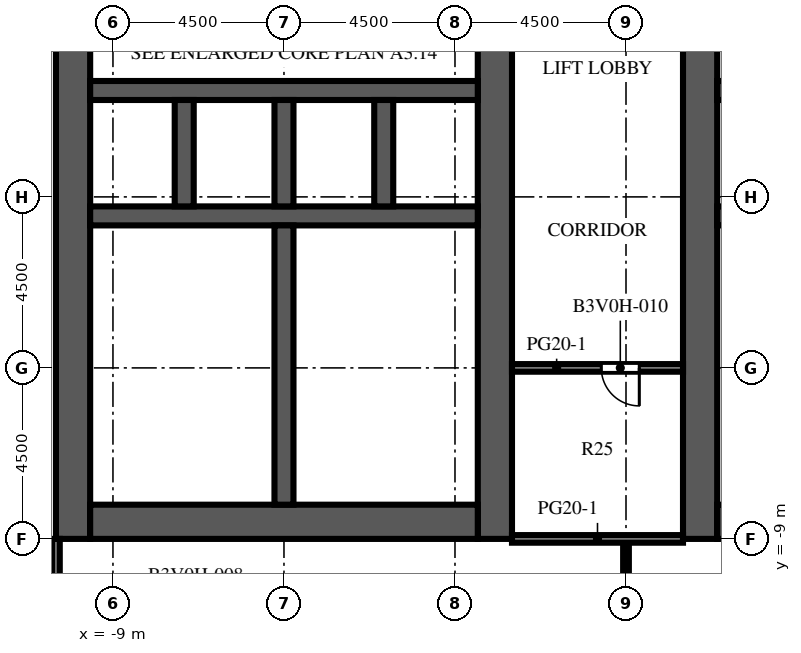
"""IFC4 building model, lengths in metres.
Left out: names, types, materials, properties, quantities, classifications, styles, units other than length and angle.
Written with IfcOpenShell. Run it as: python <this file> out.ifc"""

import sys

from ifc_helpers import new_model, si_unit, direction, frame, frame_2d, origin, place, context, subcontext, project, spatial, rectangle, extrude, element, fill, save


model = new_model("IFC4")
c1 = context("Model", 3, precision=1e-05, world=origin(), true_north=direction((0.0, 1.0)))
c2 = subcontext(c1, "Body", "Model", "MODEL_VIEW")
j1 = project(units=[si_unit("LENGTHUNIT", "METRE"), si_unit("PLANEANGLEUNIT", "RADIAN")], contexts=[c1])
p1 = place(None, origin())
s1 = spatial("IfcSite", under=j1, at=p1, CompositionType="ELEMENT")
p2 = place(p1, origin())
s2 = spatial("IfcBuilding", under=s1, at=p2, CompositionType="ELEMENT")
p3 = place(p2, frame((0.0, 0.0, 82.0)))
s3 = spatial("IfcBuildingStorey", under=s2, at=p3, CompositionType="ELEMENT", Elevation=82.0)
p4 = place(p3, frame((-10.05, -9.0, 0.0), z_axis=(0.0, 0.0, 1.0), x_axis=(0.0, 1.0, 0.0)))
e1 = element("IfcWall", 1, at=p4, inside=s3, PredefinedType="SHEAR", context=c2, shape_type="SweptSolid", body=[
    extrude(rectangle(XDim=27.5, YDim=0.9, at=frame_2d((13.75, 0.0))), origin(), (0.0, 0.0, 1.0), 4.1),
])
p5 = place(p4, frame((12.55, 0.0, 0.0)))
e2 = element("IfcOpeningElement", 2, at=p5, cuts=e1, PredefinedType="OPENING", context=c2, shape_type="SweptSolid", body=[
    extrude(rectangle(XDim=2.4, YDim=2.4, at=frame_2d((1.2, 1.2))), frame((0.0, 0.46, 0.0), z_axis=(0.0, -1.0, 0.0), x_axis=(1.0, 0.0, 0.0)), (0.0, 0.0, 1.0), 0.92),
])
p6 = place(p4, frame((6.825, 0.0, 0.0)))
e3 = element("IfcOpeningElement", 3, at=p6, cuts=e1, PredefinedType="OPENING", context=c2, shape_type="SweptSolid", body=[
    extrude(rectangle(XDim=1.2, YDim=2.1, at=frame_2d((0.6, 1.05))), frame((0.0, 0.46, 0.0), z_axis=(0.0, -1.0, 0.0), x_axis=(1.0, 0.0, 0.0)), (0.0, 0.0, 1.0), 0.92),
])
p7 = place(p4, frame((19.475, 0.0, 0.0)))
e4 = element("IfcOpeningElement", 4, at=p7, cuts=e1, PredefinedType="OPENING", context=c2, shape_type="SweptSolid", body=[
    extrude(rectangle(XDim=1.2, YDim=2.1, at=frame_2d((0.6, 1.05))), frame((0.0, 0.46, 0.0), z_axis=(0.0, -1.0, 0.0), x_axis=(1.0, 0.0, 0.0)), (0.0, 0.0, 1.0), 0.92),
])
p8 = place(p3, frame((1.05, -9.0, 0.0), z_axis=(0.0, 0.0, 1.0), x_axis=(0.0, 1.0, 0.0)))
e5 = element("IfcWall", 5, at=p8, inside=s3, PredefinedType="SHEAR", context=c2, shape_type="SweptSolid", body=[
    extrude(rectangle(XDim=27.5, YDim=0.9, at=frame_2d((13.75, 0.0))), origin(), (0.0, 0.0, 1.0), 4.1),
])
p9 = place(p8, frame((12.55, 0.0, 0.0)))
e6 = element("IfcOpeningElement", 6, at=p9, cuts=e5, PredefinedType="OPENING", context=c2, shape_type="SweptSolid", body=[
    extrude(rectangle(XDim=2.4, YDim=2.4, at=frame_2d((1.2, 1.2))), frame((0.0, 0.46, 0.0), z_axis=(0.0, -1.0, 0.0), x_axis=(1.0, 0.0, 0.0)), (0.0, 0.0, 1.0), 0.92),
])
p10 = place(p8, frame((5.445, 0.0, 0.0)))
e7 = element("IfcOpeningElement", 7, at=p10, cuts=e5, PredefinedType="OPENING", context=c2, shape_type="SweptSolid", body=[
    extrude(rectangle(XDim=1.2, YDim=2.1, at=frame_2d((0.6, 1.05))), frame((0.0, 0.46, 0.0), z_axis=(0.0, -1.0, 0.0), x_axis=(1.0, 0.0, 0.0)), (0.0, 0.0, 1.0), 0.92),
])
p11 = place(p8, frame((19.485, 0.0, 0.0)))
e8 = element("IfcOpeningElement", 8, at=p11, cuts=e5, PredefinedType="OPENING", context=c2, shape_type="SweptSolid", body=[
    extrude(rectangle(XDim=1.0, YDim=2.1, at=frame_2d((0.5, 1.05))), frame((0.0, 0.46, 0.0), z_axis=(0.0, -1.0, 0.0), x_axis=(1.0, 0.0, 0.0)), (0.0, 0.0, 1.0), 0.92),
])
p12 = place(p8, frame((21.139, 0.0, 0.0)))
e9 = element("IfcOpeningElement", 9, at=p12, cuts=e5, PredefinedType="OPENING", context=c2, shape_type="SweptSolid", body=[
    extrude(rectangle(XDim=1.0, YDim=2.1, at=frame_2d((0.5, 1.05))), frame((0.0, 0.46, 0.0), z_axis=(0.0, -1.0, 0.0), x_axis=(1.0, 0.0, 0.0)), (0.0, 0.0, 1.0), 0.92),
])
p13 = place(p8, frame((23.16, 0.0, 0.0)))
e10 = element("IfcOpeningElement", 10, at=p13, cuts=e5, PredefinedType="OPENING", context=c2, shape_type="SweptSolid", body=[
    extrude(rectangle(XDim=1.0, YDim=2.1, at=frame_2d((0.5, 1.05))), frame((0.0, 0.46, 0.0), z_axis=(0.0, -1.0, 0.0), x_axis=(1.0, 0.0, 0.0)), (0.0, 0.0, 1.0), 0.92),
])
p14 = place(p8, frame((25.181, 0.0, 0.0)))
e11 = element("IfcOpeningElement", 11, at=p14, cuts=e5, PredefinedType="OPENING", context=c2, shape_type="SweptSolid", body=[
    extrude(rectangle(XDim=1.0, YDim=2.1, at=frame_2d((0.5, 1.05))), frame((0.0, 0.46, 0.0), z_axis=(0.0, -1.0, 0.0), x_axis=(1.0, 0.0, 0.0)), (0.0, 0.0, 1.0), 0.92),
])
p15 = place(p3, frame((-9.6, -8.55, 0.0), z_axis=(0.0, 0.0, 1.0), x_axis=(1.0, 0.0, 0.0)))
e12 = element("IfcWall", 12, at=p15, inside=s3, PredefinedType="SHEAR", context=c2, shape_type="SweptSolid", body=[
    extrude(rectangle(XDim=10.2, YDim=0.9, at=frame_2d((5.1, 0.0))), origin(), (0.0, 0.0, 1.0), 4.1),
])
p16 = place(p3, frame((-9.6, -0.5, 0.0), z_axis=(0.0, 0.0, 1.0), x_axis=(1.0, 0.0, 0.0)))
e13 = element("IfcWall", 13, at=p16, inside=s3, PredefinedType="SHEAR", context=c2, shape_type="SweptSolid", body=[
    extrude(rectangle(XDim=10.2, YDim=0.5, at=frame_2d((5.1, 0.0))), origin(), (0.0, 0.0, 1.0), 4.1),
])
p17 = place(p3, frame((-9.6, 2.8, 0.0), z_axis=(0.0, 0.0, 1.0), x_axis=(1.0, 0.0, 0.0)))
e14 = element("IfcWall", 14, at=p17, inside=s3, PredefinedType="SHEAR", context=c2, shape_type="SweptSolid", body=[
    extrude(rectangle(XDim=10.2, YDim=0.5, at=frame_2d((5.1, 0.0))), origin(), (0.0, 0.0, 1.0), 4.1),
])
p18 = place(p17, frame((0.562, 0.0, 0.0)))
e15 = element("IfcOpeningElement", 15, at=p18, cuts=e14, PredefinedType="OPENING", context=c2, shape_type="SweptSolid", body=[
    extrude(rectangle(XDim=1.1, YDim=2.1, at=frame_2d((0.55, 1.05))), frame((0.0, 0.26, 0.0), z_axis=(0.0, -1.0, 0.0), x_axis=(1.0, 0.0, 0.0)), (0.0, 0.0, 1.0), 0.52),
])
p19 = place(p17, frame((3.238, 0.0, 0.0)))
e16 = element("IfcOpeningElement", 16, at=p19, cuts=e14, PredefinedType="OPENING", context=c2, shape_type="SweptSolid", body=[
    extrude(rectangle(XDim=1.1, YDim=2.1, at=frame_2d((0.55, 1.05))), frame((0.0, 0.26, 0.0), z_axis=(0.0, -1.0, 0.0), x_axis=(1.0, 0.0, 0.0)), (0.0, 0.0, 1.0), 0.52),
])
p20 = place(p17, frame((8.538, 0.0, 0.0)))
e17 = element("IfcOpeningElement", 17, at=p20, cuts=e14, PredefinedType="OPENING", context=c2, shape_type="SweptSolid", body=[
    extrude(rectangle(XDim=1.1, YDim=2.1, at=frame_2d((0.55, 1.05))), frame((0.0, 0.26, 0.0), z_axis=(0.0, -1.0, 0.0), x_axis=(1.0, 0.0, 0.0)), (0.0, 0.0, 1.0), 0.52),
])
for number, where, z_axis, x_axis in (
    (18, (-7.125, -0.25, 0.0), (0.0, 0.0, 1.0), (0.0, 1.0, 0.0)),
    (19, (-4.5, -0.25, 0.0), (0.0, 0.0, 1.0), (0.0, 1.0, 0.0)),
    (20, (-1.875, -0.25, 0.0), (0.0, 0.0, 1.0), (0.0, 1.0, 0.0)),
):
    element("IfcWall", number, at=place(p3, frame(where, z_axis=z_axis, x_axis=x_axis)), inside=s3, PredefinedType="SHEAR", context=c2, shape_type="SweptSolid", body=[
        extrude(rectangle(XDim=2.8, YDim=0.5, at=frame_2d((1.4, 0.0))), origin(), (0.0, 0.0, 1.0), 4.1),
    ])
p21 = place(p3, frame((-4.5, -8.1, 0.0), z_axis=(0.0, 0.0, 1.0), x_axis=(0.0, 1.0, 0.0)))
e21 = element("IfcWall", 21, at=p21, inside=s3, PredefinedType="SHEAR", context=c2, shape_type="SweptSolid", body=[
    extrude(rectangle(XDim=7.35, YDim=0.5, at=frame_2d((3.675, 0.0))), origin(), (0.0, 0.0, 1.0), 4.1),
])
p22 = place(p3, frame((6.45, -9.0, 0.0), z_axis=(0.0, 0.0, 1.0), x_axis=(0.0, 1.0, 0.0)))
e22 = element("IfcWall", 22, at=p22, inside=s3, PredefinedType="SHEAR", context=c2, shape_type="SweptSolid", body=[
    extrude(rectangle(XDim=27.5, YDim=0.9, at=frame_2d((13.75, 0.0))), origin(), (0.0, 0.0, 1.0), 4.1),
])
p23 = place(p22, frame((12.55, 0.0, 0.0)))
e23 = element("IfcOpeningElement", 23, at=p23, cuts=e22, PredefinedType="OPENING", context=c2, shape_type="SweptSolid", body=[
    extrude(rectangle(XDim=2.4, YDim=2.4, at=frame_2d((1.2, 1.2))), frame((0.0, 0.46, 0.0), z_axis=(0.0, -1.0, 0.0), x_axis=(1.0, 0.0, 0.0)), (0.0, 0.0, 1.0), 0.92),
])
p24 = place(p22, frame((5.445, 0.0, 0.0)))
e24 = element("IfcOpeningElement", 24, at=p24, cuts=e22, PredefinedType="OPENING", context=c2, shape_type="SweptSolid", body=[
    extrude(rectangle(XDim=1.2, YDim=2.1, at=frame_2d((0.6, 1.05))), frame((0.0, 0.46, 0.0), z_axis=(0.0, -1.0, 0.0), x_axis=(1.0, 0.0, 0.0)), (0.0, 0.0, 1.0), 0.92),
])
p25 = place(p22, frame((19.485, 0.0, 0.0)))
e25 = element("IfcOpeningElement", 25, at=p25, cuts=e22, PredefinedType="OPENING", context=c2, shape_type="SweptSolid", body=[
    extrude(rectangle(XDim=1.0, YDim=2.1, at=frame_2d((0.5, 1.05))), frame((0.0, 0.46, 0.0), z_axis=(0.0, -1.0, 0.0), x_axis=(1.0, 0.0, 0.0)), (0.0, 0.0, 1.0), 0.92),
])
p26 = place(p22, frame((21.139, 0.0, 0.0)))
e26 = element("IfcOpeningElement", 26, at=p26, cuts=e22, PredefinedType="OPENING", context=c2, shape_type="SweptSolid", body=[
    extrude(rectangle(XDim=1.0, YDim=2.1, at=frame_2d((0.5, 1.05))), frame((0.0, 0.46, 0.0), z_axis=(0.0, -1.0, 0.0), x_axis=(1.0, 0.0, 0.0)), (0.0, 0.0, 1.0), 0.92),
])
p27 = place(p22, frame((23.16, 0.0, 0.0)))
e27 = element("IfcOpeningElement", 27, at=p27, cuts=e22, PredefinedType="OPENING", context=c2, shape_type="SweptSolid", body=[
    extrude(rectangle(XDim=1.0, YDim=2.1, at=frame_2d((0.5, 1.05))), frame((0.0, 0.46, 0.0), z_axis=(0.0, -1.0, 0.0), x_axis=(1.0, 0.0, 0.0)), (0.0, 0.0, 1.0), 0.92),
])
p28 = place(p22, frame((25.181, 0.0, 0.0)))
e28 = element("IfcOpeningElement", 28, at=p28, cuts=e22, PredefinedType="OPENING", context=c2, shape_type="SweptSolid", body=[
    extrude(rectangle(XDim=1.0, YDim=2.1, at=frame_2d((0.5, 1.05))), frame((0.0, 0.46, 0.0), z_axis=(0.0, -1.0, 0.0), x_axis=(1.0, 0.0, 0.0)), (0.0, 0.0, 1.0), 0.92),
])
p29 = place(p3, frame((6.9, -8.55, 0.0), z_axis=(0.0, 0.0, 1.0), x_axis=(1.0, 0.0, 0.0)))
e29 = element("IfcWall", 29, at=p29, inside=s3, PredefinedType="SHEAR", context=c2, shape_type="SweptSolid", body=[
    extrude(rectangle(XDim=10.2, YDim=0.9, at=frame_2d((5.1, 0.0))), origin(), (0.0, 0.0, 1.0), 4.1),
])
p30 = place(p3, frame((6.9, -0.5, 0.0), z_axis=(0.0, 0.0, 1.0), x_axis=(1.0, 0.0, 0.0)))
e30 = element("IfcWall", 30, at=p30, inside=s3, PredefinedType="SHEAR", context=c2, shape_type="SweptSolid", body=[
    extrude(rectangle(XDim=10.2, YDim=0.5, at=frame_2d((5.1, 0.0))), origin(), (0.0, 0.0, 1.0), 4.1),
])
p31 = place(p3, frame((6.9, 2.8, 0.0), z_axis=(0.0, 0.0, 1.0), x_axis=(1.0, 0.0, 0.0)))
e31 = element("IfcWall", 31, at=p31, inside=s3, PredefinedType="SHEAR", context=c2, shape_type="SweptSolid", body=[
    extrude(rectangle(XDim=10.2, YDim=0.5, at=frame_2d((5.1, 0.0))), origin(), (0.0, 0.0, 1.0), 4.1),
])
p32 = place(p31, frame((0.562, 0.0, 0.0)))
e32 = element("IfcOpeningElement", 32, at=p32, cuts=e31, PredefinedType="OPENING", context=c2, shape_type="SweptSolid", body=[
    extrude(rectangle(XDim=1.1, YDim=2.1, at=frame_2d((0.55, 1.05))), frame((0.0, 0.26, 0.0), z_axis=(0.0, -1.0, 0.0), x_axis=(1.0, 0.0, 0.0)), (0.0, 0.0, 1.0), 0.52),
])
p33 = place(p31, frame((3.238, 0.0, 0.0)))
e33 = element("IfcOpeningElement", 33, at=p33, cuts=e31, PredefinedType="OPENING", context=c2, shape_type="SweptSolid", body=[
    extrude(rectangle(XDim=1.1, YDim=2.1, at=frame_2d((0.55, 1.05))), frame((0.0, 0.26, 0.0), z_axis=(0.0, -1.0, 0.0), x_axis=(1.0, 0.0, 0.0)), (0.0, 0.0, 1.0), 0.52),
])
p34 = place(p31, frame((8.538, 0.0, 0.0)))
e34 = element("IfcOpeningElement", 34, at=p34, cuts=e31, PredefinedType="OPENING", context=c2, shape_type="SweptSolid", body=[
    extrude(rectangle(XDim=1.1, YDim=2.1, at=frame_2d((0.55, 1.05))), frame((0.0, 0.26, 0.0), z_axis=(0.0, -1.0, 0.0), x_axis=(1.0, 0.0, 0.0)), (0.0, 0.0, 1.0), 0.52),
])
p35 = place(p3, frame((-0.9, -5.16, 0.0), z_axis=(0.0, 0.0, 1.0), x_axis=(1.0, 0.0, 0.0)))
e35 = element("IfcWall", 35, at=p35, inside=s3, PredefinedType="PARTITIONING", context=c2, shape_type="SweptSolid", body=[
    extrude(rectangle(XDim=1.5, YDim=0.1, at=frame_2d((0.75, 0.0))), origin(), (0.0, 0.0, 1.0), 3.65),
])
p36 = place(p35, frame((0.25, 0.0, 0.0)))
e36 = element("IfcOpeningElement", 36, at=p36, cuts=e35, PredefinedType="OPENING", context=c2, shape_type="SweptSolid", body=[
    extrude(rectangle(XDim=1.0, YDim=2.1, at=frame_2d((0.5, 1.05))), frame((0.0, 0.06, 0.0), z_axis=(0.0, -1.0, 0.0), x_axis=(1.0, 0.0, 0.0)), (0.0, 0.0, 1.0), 0.12),
])
p37 = place(p3, frame((-0.9, -5.16, 0.0), z_axis=(0.0, 0.0, 1.0), x_axis=(0.0, 1.0, 0.0)))
e37 = element("IfcWall", 37, at=p37, inside=s3, PredefinedType="PARTITIONING", context=c2, shape_type="SweptSolid", body=[
    extrude(rectangle(XDim=2.205, YDim=0.1, at=frame_2d((1.103, 0.0))), origin(), (0.0, 0.0, 1.0), 3.65),
])
p38 = place(p37, frame((0.603, 0.0, 0.0)))
e38 = element("IfcOpeningElement", 38, at=p38, cuts=e37, PredefinedType="OPENING", context=c2, shape_type="SweptSolid", body=[
    extrude(rectangle(XDim=1.0, YDim=2.1, at=frame_2d((0.5, 1.05))), frame((0.0, 0.06, 0.0), z_axis=(0.0, -1.0, 0.0), x_axis=(1.0, 0.0, 0.0)), (0.0, 0.0, 1.0), 0.12),
])
p39 = place(p3, frame((-0.9, -2.955, 0.0), z_axis=(0.0, 0.0, 1.0), x_axis=(0.0, 1.0, 0.0)))
e39 = element("IfcWall", 39, at=p39, inside=s3, PredefinedType="PARTITIONING", context=c2, shape_type="SweptSolid", body=[
    extrude(rectangle(XDim=2.205, YDim=0.1, at=frame_2d((1.103, 0.0))), origin(), (0.0, 0.0, 1.0), 3.65),
])
p40 = place(p39, frame((0.603, 0.0, 0.0)))
e40 = element("IfcOpeningElement", 40, at=p40, cuts=e39, PredefinedType="OPENING", context=c2, shape_type="SweptSolid", body=[
    extrude(rectangle(XDim=1.0, YDim=2.1, at=frame_2d((0.5, 1.05))), frame((0.0, 0.06, 0.0), z_axis=(0.0, -1.0, 0.0), x_axis=(1.0, 0.0, 0.0)), (0.0, 0.0, 1.0), 0.12),
])
for number, where, z_axis, x_axis in (
    (41, (-4.25, -5.16, 0.0), (0.0, 0.0, 1.0), (1.0, 0.0, 0.0)),
    (42, (-4.25, -2.955, 0.0), (0.0, 0.0, 1.0), (1.0, 0.0, 0.0)),
):
    element("IfcWall", number, at=place(p3, frame(where, z_axis=z_axis, x_axis=x_axis)), inside=s3, PredefinedType="PARTITIONING", context=c2, shape_type="SweptSolid", body=[
        extrude(rectangle(XDim=3.35, YDim=0.1, at=frame_2d((1.675, 0.0))), origin(), (0.0, 0.0, 1.0), 3.65),
    ])
p41 = place(p3, frame((6.9, -5.16, 0.0), z_axis=(0.0, 0.0, 1.0), x_axis=(1.0, 0.0, 0.0)))
e43 = element("IfcWall", 43, at=p41, inside=s3, PredefinedType="PARTITIONING", context=c2, shape_type="SweptSolid", body=[
    extrude(rectangle(XDim=1.5, YDim=0.1, at=frame_2d((0.75, 0.0))), origin(), (0.0, 0.0, 1.0), 3.65),
])
p42 = place(p41, frame((0.25, 0.0, 0.0)))
e44 = element("IfcOpeningElement", 44, at=p42, cuts=e43, PredefinedType="OPENING", context=c2, shape_type="SweptSolid", body=[
    extrude(rectangle(XDim=1.0, YDim=2.1, at=frame_2d((0.5, 1.05))), frame((0.0, 0.06, 0.0), z_axis=(0.0, -1.0, 0.0), x_axis=(1.0, 0.0, 0.0)), (0.0, 0.0, 1.0), 0.12),
])
p43 = place(p3, frame((-10.5, -9.0, 0.0), z_axis=(0.0, 0.0, 1.0), x_axis=(0.0, -1.0, 0.0)))
e45 = element("IfcWall", 45, at=p43, inside=s3, PredefinedType="PARTITIONING", context=c2, shape_type="SweptSolid", body=[
    extrude(rectangle(XDim=13.35, YDim=0.2, at=frame_2d((6.675, 0.0))), origin(), (0.0, 0.0, 1.0), 3.65),
])
p44 = place(p43, frame((4.15, 0.0, 0.0)))
e46 = element("IfcOpeningElement", 46, at=p44, cuts=e45, PredefinedType="OPENING", context=c2, shape_type="SweptSolid", body=[
    extrude(rectangle(XDim=1.0, YDim=2.1, at=frame_2d((0.5, 1.05))), frame((0.0, 0.11, 0.0), z_axis=(0.0, -1.0, 0.0), x_axis=(1.0, 0.0, 0.0)), (0.0, 0.0, 1.0), 0.22),
])
p45 = place(p3, frame((4.5, -9.0, 0.0), z_axis=(0.0, 0.0, 1.0), x_axis=(0.0, -1.0, 0.0)))
e47 = element("IfcWall", 47, at=p45, inside=s3, PredefinedType="PARTITIONING", context=c2, shape_type="SweptSolid", body=[
    extrude(rectangle(XDim=12.9, YDim=0.15, at=frame_2d((6.45, 0.0))), origin(), (0.0, 0.0, 1.0), 3.65),
])
p46 = place(p45, frame((3.15, 0.0, 0.0)))
e48 = element("IfcOpeningElement", 48, at=p46, cuts=e47, PredefinedType="OPENING", context=c2, shape_type="SweptSolid", body=[
    extrude(rectangle(XDim=1.0, YDim=2.1, at=frame_2d((0.5, 1.05))), frame((0.0, 0.085, 0.0), z_axis=(0.0, -1.0, 0.0), x_axis=(1.0, 0.0, 0.0)), (0.0, 0.0, 1.0), 0.17),
])
p47 = place(p3, frame((1.5, -9.0, 0.0), z_axis=(0.0, 0.0, 1.0), x_axis=(1.0, 0.0, 0.0)))
e49 = element("IfcWall", 49, at=p47, inside=s3, PredefinedType="PARTITIONING", context=c2, shape_type="SweptSolid", body=[
    extrude(rectangle(XDim=4.5, YDim=0.2, at=frame_2d((2.25, 0.0))), origin(), (0.0, 0.0, 1.0), 3.65),
])
p48 = place(p3, frame((6.0, -4.5, 0.0), z_axis=(0.0, 0.0, 1.0), x_axis=(-1.0, 0.0, 0.0)))
e50 = element("IfcWall", 50, at=p48, inside=s3, PredefinedType="PARTITIONING", context=c2, shape_type="SweptSolid", body=[
    extrude(rectangle(XDim=4.5, YDim=0.2, at=frame_2d((2.25, 0.0))), origin(), (0.0, 0.0, 1.0), 3.65),
])
p49 = place(p48, frame((1.15, 0.0, 0.0)))
e51 = element("IfcOpeningElement", 51, at=p49, cuts=e50, PredefinedType="OPENING", context=c2, shape_type="SweptSolid", body=[
    extrude(rectangle(XDim=1.0, YDim=2.1, at=frame_2d((0.5, 1.05))), frame((0.0, 0.11, 0.0), z_axis=(0.0, -1.0, 0.0), x_axis=(1.0, 0.0, 0.0)), (0.0, 0.0, 1.0), 0.22),
])
p50 = place(p18, origin())
e52 = element("IfcDoor", 52, at=p50, inside=s3, OperationType="DOUBLE_DOOR_SLIDING", PredefinedType="DOOR", context=c2, shape_type="SweptSolid", body=[
    extrude(rectangle(XDim=1.1, YDim=2.1, at=frame_2d((0.55, 1.05))), frame((0.0, 0.025, 0.0), z_axis=(0.0, -1.0, 0.0), x_axis=(1.0, 0.0, 0.0)), (0.0, 0.0, 1.0), 0.05),
])
fill(e15, e52)
p51 = place(p19, origin())
e53 = element("IfcDoor", 53, at=p51, inside=s3, OperationType="DOUBLE_DOOR_SLIDING", PredefinedType="DOOR", context=c2, shape_type="SweptSolid", body=[
    extrude(rectangle(XDim=1.1, YDim=2.1, at=frame_2d((0.55, 1.05))), frame((0.0, 0.025, 0.0), z_axis=(0.0, -1.0, 0.0), x_axis=(1.0, 0.0, 0.0)), (0.0, 0.0, 1.0), 0.05),
])
fill(e16, e53)
p52 = place(p20, origin())
e54 = element("IfcDoor", 54, at=p52, inside=s3, OperationType="DOUBLE_DOOR_SLIDING", PredefinedType="DOOR", context=c2, shape_type="SweptSolid", body=[
    extrude(rectangle(XDim=1.1, YDim=2.1, at=frame_2d((0.55, 1.05))), frame((0.0, 0.025, 0.0), z_axis=(0.0, -1.0, 0.0), x_axis=(1.0, 0.0, 0.0)), (0.0, 0.0, 1.0), 0.05),
])
fill(e17, e54)
p53 = place(p5, origin())
e55 = element("IfcDoor", 55, at=p53, inside=s3, OperationType="DOUBLE_DOOR_DOUBLE_SWING", PredefinedType="DOOR", context=c2, shape_type="SweptSolid", body=[
    extrude(rectangle(XDim=2.4, YDim=2.4, at=frame_2d((1.2, 1.2))), frame((0.0, 0.025, 0.0), z_axis=(0.0, -1.0, 0.0), x_axis=(1.0, 0.0, 0.0)), (0.0, 0.0, 1.0), 0.05),
])
fill(e2, e55)
p54 = place(p9, origin())
e56 = element("IfcDoor", 56, at=p54, inside=s3, OperationType="DOUBLE_DOOR_DOUBLE_SWING", PredefinedType="DOOR", context=c2, shape_type="SweptSolid", body=[
    extrude(rectangle(XDim=2.4, YDim=2.4, at=frame_2d((1.2, 1.2))), frame((0.0, 0.025, 0.0), z_axis=(0.0, -1.0, 0.0), x_axis=(1.0, 0.0, 0.0)), (0.0, 0.0, 1.0), 0.05),
])
fill(e6, e56)
p55 = place(p23, origin())
e57 = element("IfcDoor", 57, at=p55, inside=s3, OperationType="DOUBLE_DOOR_DOUBLE_SWING", PredefinedType="DOOR", context=c2, shape_type="SweptSolid", body=[
    extrude(rectangle(XDim=2.4, YDim=2.4, at=frame_2d((1.2, 1.2))), frame((0.0, 0.025, 0.0), z_axis=(0.0, -1.0, 0.0), x_axis=(1.0, 0.0, 0.0)), (0.0, 0.0, 1.0), 0.05),
])
fill(e23, e57)
p56 = place(p6, origin())
e58 = element("IfcDoor", 58, at=p56, inside=s3, OperationType="SINGLE_SWING_LEFT", PredefinedType="DOOR", context=c2, shape_type="SweptSolid", body=[
    extrude(rectangle(XDim=1.2, YDim=2.1, at=frame_2d((0.6, 1.05))), frame((0.0, 0.025, 0.0), z_axis=(0.0, -1.0, 0.0), x_axis=(1.0, 0.0, 0.0)), (0.0, 0.0, 1.0), 0.05),
])
fill(e3, e58)
p57 = place(p10, origin())
e59 = element("IfcDoor", 59, at=p57, inside=s3, OperationType="SINGLE_SWING_LEFT", PredefinedType="DOOR", context=c2, shape_type="SweptSolid", body=[
    extrude(rectangle(XDim=1.2, YDim=2.1, at=frame_2d((0.6, 1.05))), frame((0.0, 0.425, 0.0), z_axis=(0.0, -1.0, 0.0), x_axis=(1.0, 0.0, 0.0)), (0.0, 0.0, 1.0), 0.05),
])
fill(e7, e59)
p58 = place(p36, origin())
e60 = element("IfcDoor", 60, at=p58, inside=s3, OperationType="SINGLE_SWING_RIGHT", PredefinedType="DOOR", context=c2, shape_type="SweptSolid", body=[
    extrude(rectangle(XDim=1.0, YDim=2.1, at=frame_2d((0.5, 1.05))), frame((0.0, 0.025, 0.0), z_axis=(0.0, -1.0, 0.0), x_axis=(1.0, 0.0, 0.0)), (0.0, 0.0, 1.0), 0.05),
])
fill(e36, e60)
p59 = place(p38, origin())
e61 = element("IfcDoor", 61, at=p59, inside=s3, OperationType="SINGLE_SWING_LEFT", PredefinedType="DOOR", context=c2, shape_type="SweptSolid", body=[
    extrude(rectangle(XDim=1.0, YDim=2.1, at=frame_2d((0.5, 1.05))), frame((0.0, 0.025, 0.0), z_axis=(0.0, -1.0, 0.0), x_axis=(1.0, 0.0, 0.0)), (0.0, 0.0, 1.0), 0.05),
])
fill(e38, e61)
p60 = place(p40, origin())
e62 = element("IfcDoor", 62, at=p60, inside=s3, OperationType="SINGLE_SWING_RIGHT", PredefinedType="DOOR", context=c2, shape_type="SweptSolid", body=[
    extrude(rectangle(XDim=1.0, YDim=2.1, at=frame_2d((0.5, 1.05))), frame((0.0, 0.025, 0.0), z_axis=(0.0, -1.0, 0.0), x_axis=(1.0, 0.0, 0.0)), (0.0, 0.0, 1.0), 0.05),
])
fill(e40, e62)
p61 = place(p24, origin())
e63 = element("IfcDoor", 63, at=p61, inside=s3, OperationType="SINGLE_SWING_RIGHT", PredefinedType="DOOR", context=c2, shape_type="SweptSolid", body=[
    extrude(rectangle(XDim=1.2, YDim=2.1, at=frame_2d((0.6, 1.05))), frame((0.0, -0.375, 0.0), z_axis=(0.0, -1.0, 0.0), x_axis=(1.0, 0.0, 0.0)), (0.0, 0.0, 1.0), 0.05),
])
fill(e24, e63)
p62 = place(p49, origin())
e64 = element("IfcDoor", 64, at=p62, inside=s3, OperationType="SINGLE_SWING_LEFT", PredefinedType="DOOR", context=c2, shape_type="SweptSolid", body=[
    extrude(rectangle(XDim=1.0, YDim=2.1, at=frame_2d((0.5, 1.05))), frame((0.0, 0.025, 0.0), z_axis=(0.0, -1.0, 0.0), x_axis=(1.0, 0.0, 0.0)), (0.0, 0.0, 1.0), 0.05),
])
fill(e51, e64)
save(model, sys.argv[1])
